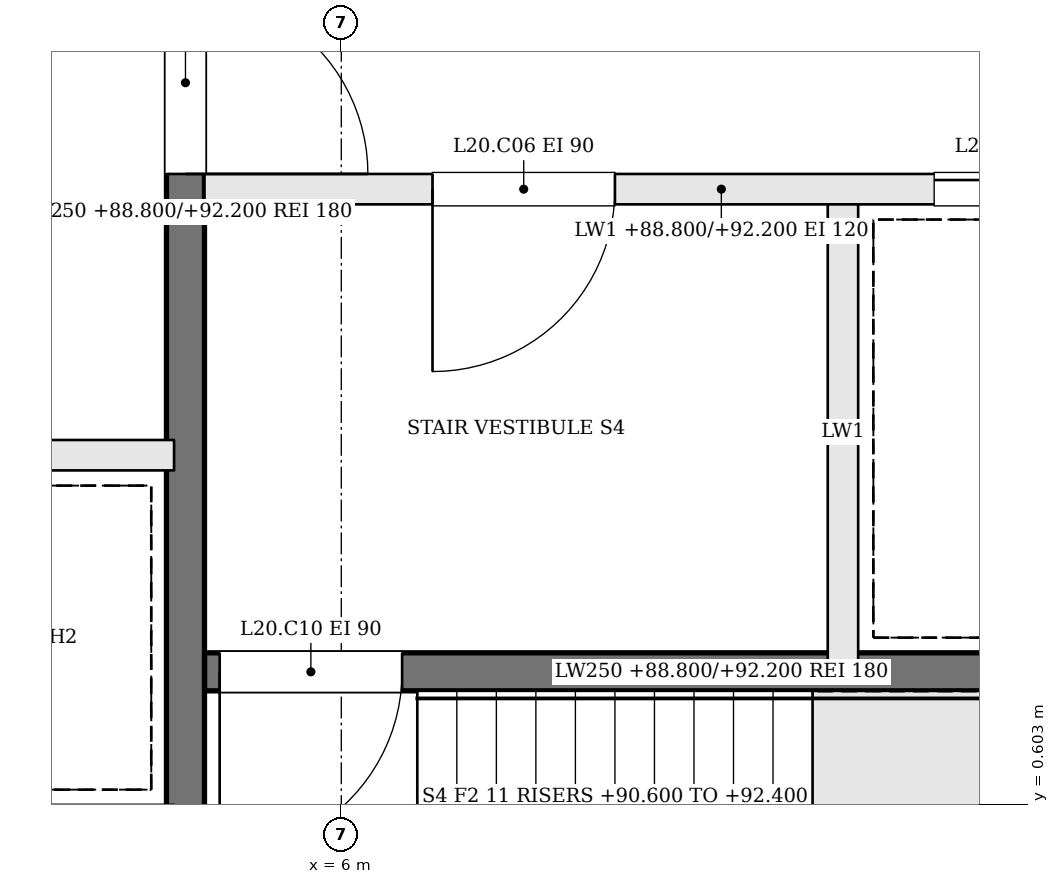
"""IFC4 building model, lengths in metres.
Left out: names, types, materials, properties, quantities, classifications, styles, units other than length and angle.
Written with IfcOpenShell. Run it as: python <this file> out.ifc"""

import sys

from ifc_helpers import new_model, si_unit, direction, frame, frame_2d, origin, place, context, subcontext, project, spatial, rectangle, extrude, element, fill, save


model = new_model("IFC4")
c1 = context("Model", 3, precision=1e-05, world=origin(), true_north=direction((0.0, 1.0)))
c2 = subcontext(c1, "Body", "Model", "MODEL_VIEW")
j1 = project(units=[si_unit("LENGTHUNIT", "METRE"), si_unit("PLANEANGLEUNIT", "RADIAN")], contexts=[c1])
p1 = place(None, origin())
s1 = spatial("IfcSite", under=j1, at=p1, CompositionType="ELEMENT")
p2 = place(p1, origin())
s2 = spatial("IfcBuilding", under=s1, at=p2, CompositionType="ELEMENT")
p3 = place(p2, frame((0.0, 0.0, 88.8)))
s3 = spatial("IfcBuildingStorey", under=s2, at=p3, CompositionType="ELEMENT", Elevation=88.8)
p4 = place(p3, frame((11.9, 4.65, 0.0), z_axis=(0.0, 0.0, 1.0), x_axis=(-1.0, 0.0, 0.0)))
e1 = element("IfcWall", 1, at=p4, inside=s3, PredefinedType="SOLIDWALL", context=c2, shape_type="SweptSolid", body=[
    extrude(rectangle(XDim=6.8, YDim=0.2, at=frame_2d((3.4, 0.0))), origin(), (0.0, 0.0, 1.0), 3.4),
])
p5 = place(p4, frame((4.1, 0.0, 0.0)))
e2 = element("IfcOpeningElement", 2, at=p5, cuts=e1, PredefinedType="OPENING", context=c2, shape_type="SweptSolid", body=[
    extrude(rectangle(XDim=1.2, YDim=2.1, at=frame_2d((0.6, 1.05))), frame((0.0, 0.11, 0.0), z_axis=(0.0, -1.0, 0.0), x_axis=(1.0, 0.0, 0.0)), (0.0, 0.0, 1.0), 0.22),
])
p6 = place(p4, frame((0.8, 0.0, 0.0)))
e3 = element("IfcOpeningElement", 3, at=p6, cuts=e1, PredefinedType="OPENING", context=c2, shape_type="SweptSolid", body=[
    extrude(rectangle(XDim=1.2, YDim=2.1, at=frame_2d((0.6, 1.05))), frame((0.0, 0.11, 0.0), z_axis=(0.0, -1.0, 0.0), x_axis=(1.0, 0.0, 0.0)), (0.0, 0.0, 1.0), 0.22),
])
p7 = place(p3, frame((11.9, 1.475, 0.0), z_axis=(0.0, 0.0, 1.0), x_axis=(-1.0, 0.0, 0.0)))
e4 = element("IfcWall", 4, at=p7, inside=s3, PredefinedType="SOLIDWALL", context=c2, shape_type="SweptSolid", body=[
    extrude(rectangle(XDim=6.8, YDim=0.25, at=frame_2d((3.4, 0.0))), origin(), (0.0, 0.0, 1.0), 3.4),
])
p8 = place(p7, frame((5.5, 0.0, 0.0)))
e5 = element("IfcOpeningElement", 5, at=p8, cuts=e4, PredefinedType="OPENING", context=c2, shape_type="SweptSolid", body=[
    extrude(rectangle(XDim=1.2, YDim=2.1, at=frame_2d((0.6, 1.05))), frame((0.0, 0.135, 0.0), z_axis=(0.0, -1.0, 0.0), x_axis=(1.0, 0.0, 0.0)), (0.0, 0.0, 1.0), 0.27),
])
p9 = place(p3, frame((9.3, 4.55, 0.0), z_axis=(0.0, 0.0, 1.0), x_axis=(0.0, -1.0, 0.0)))
e6 = element("IfcWall", 6, at=p9, inside=s3, PredefinedType="SOLIDWALL", context=c2, shape_type="SweptSolid", body=[
    extrude(rectangle(XDim=3.0, YDim=0.2, at=frame_2d((1.5, 0.0))), origin(), (0.0, 0.0, 1.0), 3.4),
])
p10 = place(p3, frame((4.975, 10.9, 0.0), z_axis=(0.0, 0.0, 1.0), x_axis=(0.0, -1.0, 0.0)))
e7 = element("IfcWall", 7, at=p10, inside=s3, PredefinedType="SOLIDWALL", context=c2, shape_type="SweptSolid", body=[
    extrude(rectangle(XDim=12.8, YDim=0.25, at=frame_2d((6.4, 0.0))), origin(), (0.0, 0.0, 1.0), 3.4),
])
p11 = place(p10, frame((4.95, 0.0, 0.0)))
e8 = element("IfcOpeningElement", 8, at=p11, cuts=e7, PredefinedType="OPENING", context=c2, shape_type="SweptSolid", body=[
    extrude(rectangle(XDim=1.2, YDim=2.1, at=frame_2d((0.6, 1.05))), frame((0.0, 0.135, 0.0), z_axis=(0.0, -1.0, 0.0), x_axis=(1.0, 0.0, 0.0)), (0.0, 0.0, 1.0), 0.27),
])
p12 = place(p3, frame((-4.9, 2.9, 0.0), z_axis=(0.0, 0.0, 1.0), x_axis=(1.0, 0.0, 0.0)))
e9 = element("IfcWall", 9, at=p12, inside=s3, PredefinedType="SOLIDWALL", context=c2, shape_type="SweptSolid", body=[
    extrude(rectangle(XDim=9.8, YDim=0.2, at=frame_2d((4.9, 0.0))), origin(), (0.0, 0.0, 1.0), 3.4),
])
p13 = place(p12, frame((0.675, 0.0, 0.0)))
e10 = element("IfcOpeningElement", 10, at=p13, cuts=e9, PredefinedType="OPENING", context=c2, shape_type="SweptSolid", body=[
    extrude(rectangle(XDim=1.1, YDim=2.1, at=frame_2d((0.55, 1.05))), frame((0.0, 0.11, 0.0), z_axis=(0.0, -1.0, 0.0), x_axis=(1.0, 0.0, 0.0)), (0.0, 0.0, 1.0), 0.22),
])
p14 = place(p12, frame((3.125, 0.0, 0.0)))
e11 = element("IfcOpeningElement", 11, at=p14, cuts=e9, PredefinedType="OPENING", context=c2, shape_type="SweptSolid", body=[
    extrude(rectangle(XDim=1.1, YDim=2.1, at=frame_2d((0.55, 1.05))), frame((0.0, 0.11, 0.0), z_axis=(0.0, -1.0, 0.0), x_axis=(1.0, 0.0, 0.0)), (0.0, 0.0, 1.0), 0.22),
])
p15 = place(p11, origin())
e12 = element("IfcDoor", 12, at=p15, inside=s3, OperationType="SINGLE_SWING_RIGHT", PredefinedType="DOOR", context=c2, shape_type="SweptSolid", body=[
    extrude(rectangle(XDim=1.2, YDim=2.1, at=frame_2d((0.6, 1.05))), frame((0.0, 0.025, 0.0), z_axis=(0.0, -1.0, 0.0), x_axis=(1.0, 0.0, 0.0)), (0.0, 0.0, 1.0), 0.05),
])
fill(e8, e12)
p16 = place(p5, origin())
e13 = element("IfcDoor", 13, at=p16, inside=s3, OperationType="SINGLE_SWING_RIGHT", PredefinedType="DOOR", context=c2, shape_type="SweptSolid", body=[
    extrude(rectangle(XDim=1.2, YDim=2.1, at=frame_2d((0.6, 1.05))), frame((0.0, 0.025, 0.0), z_axis=(0.0, -1.0, 0.0), x_axis=(1.0, 0.0, 0.0)), (0.0, 0.0, 1.0), 0.05),
])
fill(e2, e13)
p17 = place(p8, origin())
e14 = element("IfcDoor", 14, at=p17, inside=s3, OperationType="SINGLE_SWING_RIGHT", PredefinedType="DOOR", context=c2, shape_type="SweptSolid", body=[
    extrude(rectangle(XDim=1.2, YDim=2.1, at=frame_2d((0.6, 1.05))), frame((0.0, 0.025, 0.0), z_axis=(0.0, -1.0, 0.0), x_axis=(1.0, 0.0, 0.0)), (0.0, 0.0, 1.0), 0.05),
])
fill(e5, e14)
p18 = place(p6, origin())
e15 = element("IfcDoor", 15, at=p18, inside=s3, OperationType="SLIDING_TO_RIGHT", PredefinedType="DOOR", context=c2, shape_type="SweptSolid", body=[
    extrude(rectangle(XDim=1.2, YDim=2.1, at=frame_2d((0.6, 1.05))), frame((0.0, 0.025, 0.0), z_axis=(0.0, -1.0, 0.0), x_axis=(1.0, 0.0, 0.0)), (0.0, 0.0, 1.0), 0.05),
])
fill(e3, e15)
save(model, sys.argv[1])
